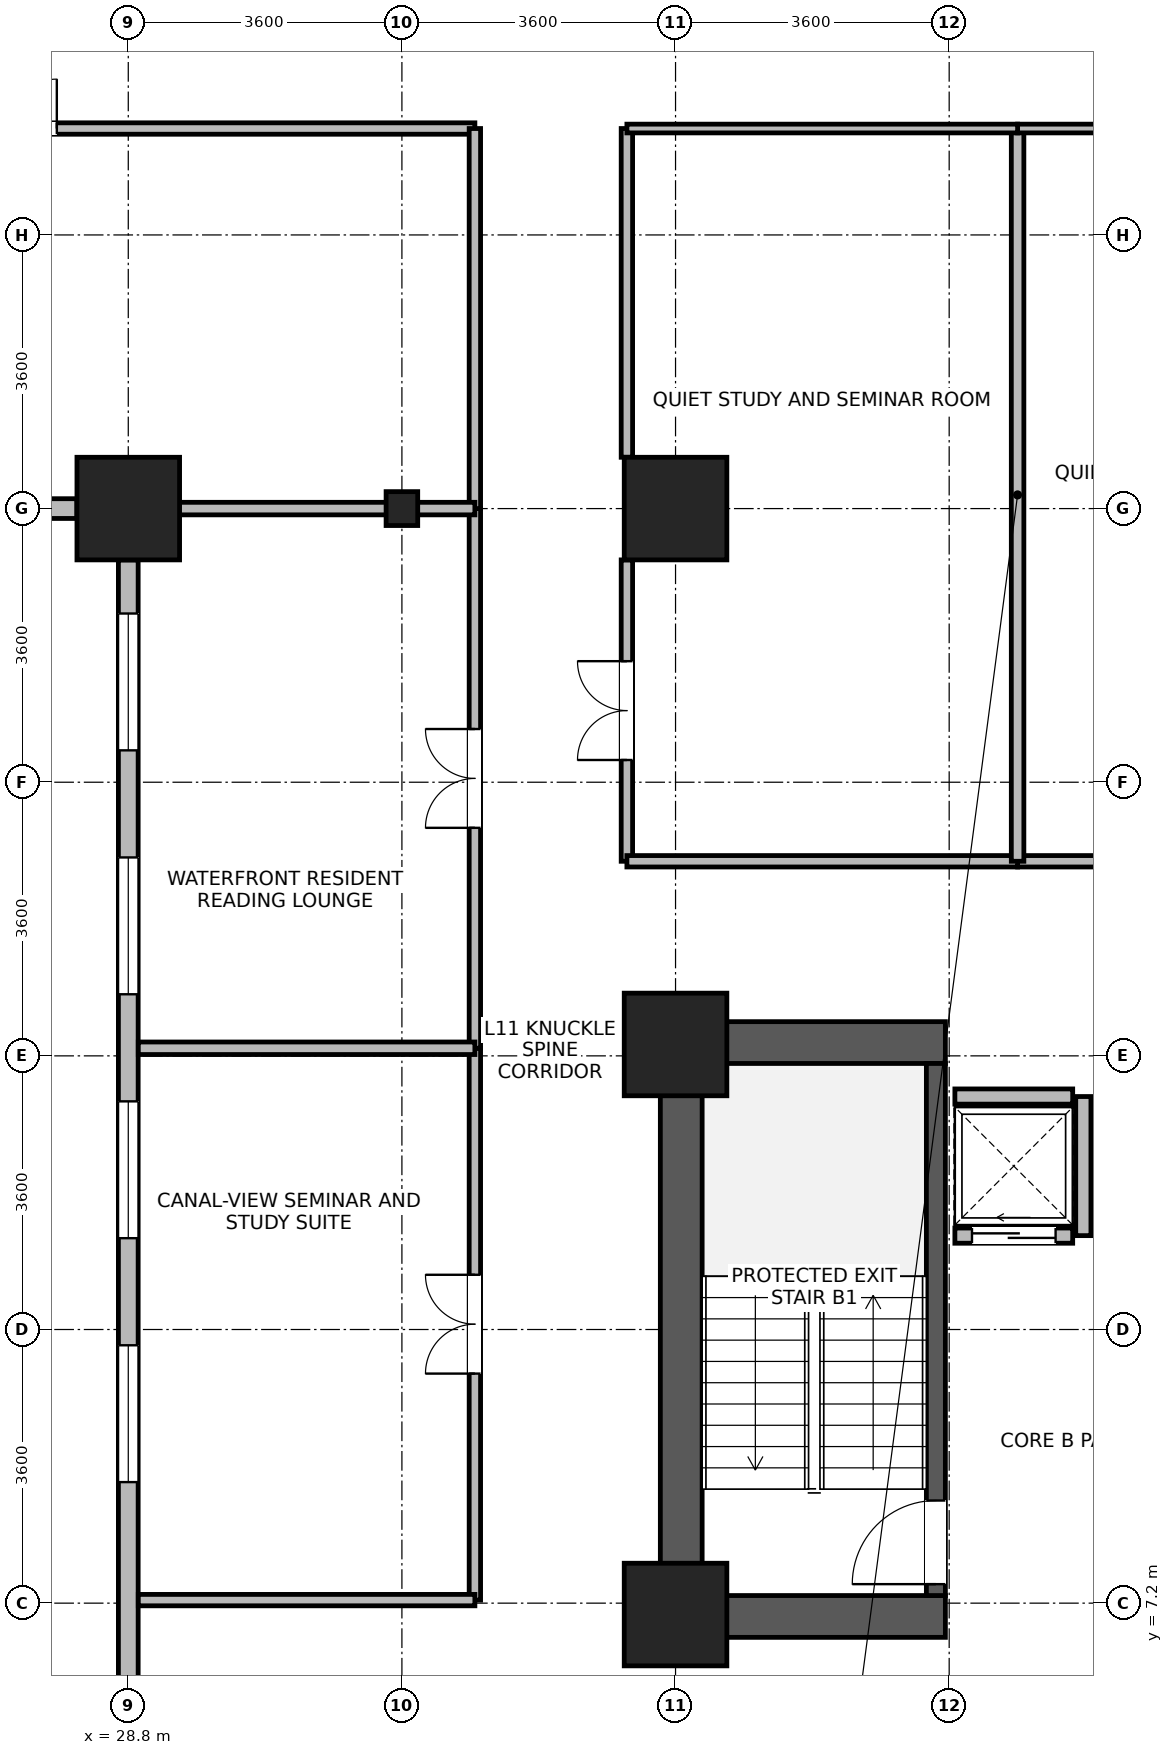
"""IFC4 building model, lengths in metres.
Left out: names, types, materials, properties, quantities, classifications, styles, units other than length and angle.
Written with IfcOpenShell. Run it as: python <this file> out.ifc"""

import sys

from ifc_helpers import new_model, si_unit, direction, frame, frame_2d, origin, origin_2d, place, context, subcontext, project, spatial, rectangle, i_section, extrude, source, transform, mapped, element, fill, save


model = new_model("IFC4")
c1 = context("Model", 3, precision=1e-05, world=origin(), true_north=direction((0.0, 1.0)))
c2 = subcontext(c1, "Body", "Model", "MODEL_VIEW")
j1 = project(units=[si_unit("LENGTHUNIT", "METRE"), si_unit("PLANEANGLEUNIT", "RADIAN")], contexts=[c1])
p1 = place(None, origin())
s1 = spatial("IfcSite", under=j1, at=p1, CompositionType="ELEMENT")
p2 = place(p1, origin())
s2 = spatial("IfcBuilding", under=s1, at=p2, CompositionType="ELEMENT")
p3 = place(p2, frame((0.0, 0.0, 47.5)))
s3 = spatial("IfcBuildingStorey", under=s2, at=p3, CompositionType="ELEMENT", Elevation=47.5)
p4 = place(p3, frame((36.075, 6.75, 0.0), z_axis=(0.0, 0.0, 1.0), x_axis=(0.0, 1.0, 0.0)))
e1 = element("IfcWall", 1, at=p4, inside=s3, PredefinedType="SHEAR", context=c2, shape_type="SweptSolid", body=[
    extrude(rectangle(XDim=8.1, YDim=0.55, at=frame_2d((4.05, 0.0))), origin(), (0.0, 0.0, 1.0), 3.45),
])
for number, where, z_axis, x_axis in (
    (2, (36.35, 7.025, 0.0), (0.0, 0.0, 1.0), (1.0, 0.0, 0.0)),
    (3, (36.35, 14.575, 0.0), (0.0, 0.0, 1.0), (1.0, 0.0, 0.0)),
):
    element("IfcWall", number, at=place(p3, frame(where, z_axis=z_axis, x_axis=x_axis)), inside=s3, PredefinedType="SHEAR", context=c2, shape_type="SweptSolid", body=[
        extrude(rectangle(XDim=3.2, YDim=0.55, at=frame_2d((1.6, 0.0))), origin(), (0.0, 0.0, 1.0), 3.45),
    ])
p5 = place(p3, frame((39.425, 7.3, 0.0), z_axis=(0.0, 0.0, 1.0), x_axis=(0.0, 1.0, 0.0)))
e4 = element("IfcWall", 4, at=p5, inside=s3, PredefinedType="SHEAR", context=c2, shape_type="SweptSolid", body=[
    extrude(rectangle(XDim=7.0, YDim=0.25, at=frame_2d((3.5, 0.0))), origin(), (0.0, 0.0, 1.0), 3.45),
])
p6 = place(p5, frame((0.15, 0.0, 0.0)))
e5 = element("IfcOpeningElement", 5, at=p6, cuts=e4, PredefinedType="OPENING", context=c2, shape_type="SweptSolid", body=[
    extrude(rectangle(XDim=1.1, YDim=2.08, at=frame_2d((0.55, 1.04))), frame((0.0, 0.135, 0.0), z_axis=(0.0, -1.0, 0.0), x_axis=(1.0, 0.0, 0.0)), (0.0, 0.0, 1.0), 0.27),
])
m1 = source(origin(), c2, "Body", "SweptSolid", [
    extrude(rectangle(XDim=1.35, YDim=1.35, at=origin_2d()), origin(), (0.0, 0.0, 1.0), 3.7),
])
for number, where, z_axis, x_axis in (
    (6, (28.8, 21.6, 0.0), (0.0, 0.0, 1.0), (1.0, 0.0, 0.0)),
    (7, (36.0, 21.6, 0.0), (0.0, 0.0, 1.0), (1.0, 0.0, 0.0)),
    (8, (36.0, 7.05, 0.0), (0.0, 0.0, 1.0), (1.0, 0.0, 0.0)),
    (9, (36.0, 14.55, 0.0), (0.0, 0.0, 1.0), (1.0, 0.0, 0.0)),
):
    element("IfcColumn", number, at=place(p3, frame(where, z_axis=z_axis, x_axis=x_axis)), inside=s3, PredefinedType="COLUMN", context=c2, shape_type="MappedRepresentation", body=[
        mapped(m1, transform((0.0, 0.0, 0.0), x_axis=(1.0, 0.0, 0.0), y_axis=(0.0, 1.0, 0.0), z_axis=(0.0, 0.0, 1.0), scale=1.0)),
    ])
m2 = source(origin(), c2, "Body", "SweptSolid", [
    extrude(i_section(OverallWidth=0.416, OverallDepth=0.446, WebThickness=0.029, FlangeThickness=0.04, FilletRadius=0.015, at=origin_2d()), origin(), (0.0, 0.0, 1.0), 3.7),
])
p7 = place(p3, frame((32.4, 21.6, 0.0), z_axis=(0.0, 0.0, 1.0), x_axis=(1.0, 0.0, 0.0)))
e10 = element("IfcColumn", 10, at=p7, inside=s3, PredefinedType="COLUMN", context=c2, shape_type="MappedRepresentation", body=[
    mapped(m2, transform((0.0, 0.0, 0.0), x_axis=(1.0, 0.0, 0.0), y_axis=(0.0, 1.0, 0.0), z_axis=(0.0, 0.0, 1.0), scale=1.0)),
])
p8 = place(p3, frame((28.124, 21.6, 0.0), z_axis=(0.0, 0.0, 1.0), x_axis=(-1.0, 0.0, 0.0)))
e11 = element("IfcWall", 11, at=p8, inside=s3, PredefinedType="STANDARD", context=c2, shape_type="SweptSolid", body=[
    extrude(rectangle(XDim=2.715, YDim=0.26, at=frame_2d((1.357, 0.0))), origin(), (0.0, 0.0, 1.0), 2.93),
])
p9 = place(p8, frame((0.883, 0.0, 0.85)))
e12 = element("IfcOpeningElement", 12, at=p9, cuts=e11, PredefinedType="OPENING", context=c2, shape_type="SweptSolid", body=[
    extrude(rectangle(XDim=0.95, YDim=1.75, at=frame_2d((0.475, 0.875))), frame((0.0, 0.14, 0.0), z_axis=(0.0, -1.0, 0.0), x_axis=(1.0, 0.0, 0.0)), (0.0, 0.0, 1.0), 0.28),
])
p10 = place(p3, frame((28.8, 1.67, 0.0), z_axis=(0.0, 0.0, 1.0), x_axis=(0.0, 1.0, 0.0)))
e13 = element("IfcWall", 13, at=p10, inside=s3, PredefinedType="STANDARD", context=c2, shape_type="SweptSolid", body=[
    extrude(rectangle(XDim=19.254, YDim=0.26, at=frame_2d((9.627, 0.0))), origin(), (0.0, 0.0, 1.0), 3.43),
])
p11 = place(p10, frame((0.705, 0.0, 0.85)))
e14 = element("IfcOpeningElement", 14, at=p11, cuts=e13, PredefinedType="OPENING", context=c2, shape_type="SweptSolid", body=[
    extrude(rectangle(XDim=1.8, YDim=1.85, at=frame_2d((0.9, 0.925))), frame((0.0, 0.14, 0.0), z_axis=(0.0, -1.0, 0.0), x_axis=(1.0, 0.0, 0.0)), (0.0, 0.0, 1.0), 0.28),
])
p12 = place(p10, frame((7.123, 0.0, 0.85)))
e15 = element("IfcOpeningElement", 15, at=p12, cuts=e13, PredefinedType="OPENING", context=c2, shape_type="SweptSolid", body=[
    extrude(rectangle(XDim=1.8, YDim=1.85, at=frame_2d((0.9, 0.925))), frame((0.0, 0.14, 0.0), z_axis=(0.0, -1.0, 0.0), x_axis=(1.0, 0.0, 0.0)), (0.0, 0.0, 1.0), 0.28),
])
p13 = place(p10, frame((10.332, 0.0, 0.85)))
e16 = element("IfcOpeningElement", 16, at=p13, cuts=e13, PredefinedType="OPENING", context=c2, shape_type="SweptSolid", body=[
    extrude(rectangle(XDim=1.8, YDim=1.85, at=frame_2d((0.9, 0.925))), frame((0.0, 0.14, 0.0), z_axis=(0.0, -1.0, 0.0), x_axis=(1.0, 0.0, 0.0)), (0.0, 0.0, 1.0), 0.28),
])
p14 = place(p10, frame((13.541, 0.0, 0.85)))
e17 = element("IfcOpeningElement", 17, at=p14, cuts=e13, PredefinedType="OPENING", context=c2, shape_type="SweptSolid", body=[
    extrude(rectangle(XDim=1.8, YDim=1.85, at=frame_2d((0.9, 0.925))), frame((0.0, 0.14, 0.0), z_axis=(0.0, -1.0, 0.0), x_axis=(1.0, 0.0, 0.0)), (0.0, 0.0, 1.0), 0.28),
])
p15 = place(p10, frame((16.75, 0.0, 0.85)))
e18 = element("IfcOpeningElement", 18, at=p15, cuts=e13, PredefinedType="OPENING", context=c2, shape_type="SweptSolid", body=[
    extrude(rectangle(XDim=1.8, YDim=1.85, at=frame_2d((0.9, 0.925))), frame((0.0, 0.14, 0.0), z_axis=(0.0, -1.0, 0.0), x_axis=(1.0, 0.0, 0.0)), (0.0, 0.0, 1.0), 0.28),
])
p16 = place(p3, frame((39.675, 12.035, 0.0), z_axis=(0.0, 0.0, 1.0), x_axis=(1.0, 0.0, 0.0)))
e19 = element("IfcWall", 19, at=p16, inside=s3, PredefinedType="PARTITIONING", context=c2, shape_type="SweptSolid", body=[
    extrude(rectangle(XDim=1.55, YDim=0.2, at=frame_2d((0.775, 0.0))), origin(), (0.0, 0.0, 1.0), 3.43),
])
p17 = place(p16, frame((0.225, 0.0, 0.0)))
e20 = element("IfcOpeningElement", 20, at=p17, cuts=e19, PredefinedType="OPENING", context=c2, shape_type="SweptSolid", body=[
    extrude(rectangle(XDim=1.1, YDim=2.12, at=frame_2d((0.55, 1.06))), frame((0.0, 0.11, 0.0), z_axis=(0.0, -1.0, 0.0), x_axis=(1.0, 0.0, 0.0)), (0.0, 0.0, 1.0), 0.22),
])
p18 = place(p3, frame((39.675, 13.865, 0.0), z_axis=(0.0, 0.0, 1.0), x_axis=(1.0, 0.0, 0.0)))
e21 = element("IfcWall", 21, at=p18, inside=s3, PredefinedType="PARTITIONING", context=c2, shape_type="SweptSolid", body=[
    extrude(rectangle(XDim=1.55, YDim=0.2, at=frame_2d((0.775, 0.0))), origin(), (0.0, 0.0, 1.0), 3.43),
])
p19 = place(p3, frame((41.365, 12.035, 0.0), z_axis=(0.0, 0.0, 1.0), x_axis=(0.0, 1.0, 0.0)))
e22 = element("IfcWall", 22, at=p19, inside=s3, PredefinedType="PARTITIONING", context=c2, shape_type="SweptSolid", body=[
    extrude(rectangle(XDim=1.83, YDim=0.2, at=frame_2d((0.915, 0.0))), origin(), (0.0, 0.0, 1.0), 3.43),
])
p20 = place(p3, frame((21.06, 26.6, 0.0), z_axis=(0.0, 0.0, 1.0), x_axis=(1.0, 0.0, 0.0)))
e23 = element("IfcWall", 23, at=p20, inside=s3, PredefinedType="PARTITIONING", context=c2, shape_type="SweptSolid", body=[
    extrude(rectangle(XDim=12.3, YDim=0.15, at=frame_2d((6.15, 0.0))), origin(), (0.0, 0.0, 1.0), 3.43),
])
p21 = place(p20, frame((5.5, 0.0, 0.0)))
e24 = element("IfcOpeningElement", 24, at=p21, cuts=e23, PredefinedType="OPENING", context=c2, shape_type="SweptSolid", body=[
    extrude(rectangle(XDim=1.3, YDim=2.12, at=frame_2d((0.65, 1.06))), frame((0.0, 0.085, 0.0), z_axis=(0.0, -1.0, 0.0), x_axis=(1.0, 0.0, 0.0)), (0.0, 0.0, 1.0), 0.17),
])
p22 = place(p3, frame((35.36, 16.96, 0.0), z_axis=(0.0, 0.0, 1.0), x_axis=(0.0, 1.0, 0.0)))
e25 = element("IfcWall", 25, at=p22, inside=s3, PredefinedType="PARTITIONING", context=c2, shape_type="SweptSolid", body=[
    extrude(rectangle(XDim=3.965, YDim=0.15, at=frame_2d((1.982, 0.0))), origin(), (0.0, 0.0, 1.0), 3.43),
])
p23 = place(p22, frame((1.333, 0.0, 0.0)))
e26 = element("IfcOpeningElement", 26, at=p23, cuts=e25, PredefinedType="OPENING", context=c2, shape_type="SweptSolid", body=[
    extrude(rectangle(XDim=1.3, YDim=2.12, at=frame_2d((0.65, 1.06))), frame((0.0, 0.085, 0.0), z_axis=(0.0, -1.0, 0.0), x_axis=(1.0, 0.0, 0.0)), (0.0, 0.0, 1.0), 0.17),
])
p24 = place(p3, frame((35.36, 22.275, 0.0), z_axis=(0.0, 0.0, 1.0), x_axis=(0.0, 1.0, 0.0)))
e27 = element("IfcWall", 27, at=p24, inside=s3, PredefinedType="PARTITIONING", context=c2, shape_type="SweptSolid", body=[
    extrude(rectangle(XDim=4.325, YDim=0.15, at=frame_2d((2.163, 0.0))), origin(), (0.0, 0.0, 1.0), 3.43),
])
p25 = place(p3, frame((33.36, 7.24, 0.0), z_axis=(0.0, 0.0, 1.0), x_axis=(0.0, 1.0, 0.0)))
e28 = element("IfcWall", 28, at=p25, inside=s3, PredefinedType="PARTITIONING", context=c2, shape_type="SweptSolid", body=[
    extrude(rectangle(XDim=7.26, YDim=0.15, at=frame_2d((3.63, 0.0))), origin(), (0.0, 0.0, 1.0), 3.43),
])
p26 = place(p25, frame((2.98, 0.0, 0.0)))
e29 = element("IfcOpeningElement", 29, at=p26, cuts=e28, PredefinedType="OPENING", context=c2, shape_type="SweptSolid", body=[
    extrude(rectangle(XDim=1.3, YDim=2.12, at=frame_2d((0.65, 1.06))), frame((0.0, 0.085, 0.0), z_axis=(0.0, -1.0, 0.0), x_axis=(1.0, 0.0, 0.0)), (0.0, 0.0, 1.0), 0.17),
])
p27 = place(p3, frame((33.36, 14.5, 0.0), z_axis=(0.0, 0.0, 1.0), x_axis=(0.0, 1.0, 0.0)))
e30 = element("IfcWall", 30, at=p27, inside=s3, PredefinedType="PARTITIONING", context=c2, shape_type="SweptSolid", body=[
    extrude(rectangle(XDim=7.1, YDim=0.15, at=frame_2d((3.55, 0.0))), origin(), (0.0, 0.0, 1.0), 3.43),
])
p28 = place(p27, frame((2.9, 0.0, 0.0)))
e31 = element("IfcOpeningElement", 31, at=p28, cuts=e30, PredefinedType="OPENING", context=c2, shape_type="SweptSolid", body=[
    extrude(rectangle(XDim=1.3, YDim=2.12, at=frame_2d((0.65, 1.06))), frame((0.0, 0.085, 0.0), z_axis=(0.0, -1.0, 0.0), x_axis=(1.0, 0.0, 0.0)), (0.0, 0.0, 1.0), 0.17),
])
p29 = place(p3, frame((40.5, 16.96, 0.0), z_axis=(0.0, 0.0, 1.0), x_axis=(1.0, 0.0, 0.0)))
e32 = element("IfcWall", 32, at=p29, inside=s3, PredefinedType="PARTITIONING", context=c2, shape_type="SweptSolid", body=[
    extrude(rectangle(XDim=5.42, YDim=0.15, at=frame_2d((2.71, 0.0))), origin(), (0.0, 0.0, 1.0), 3.43),
])
p30 = place(p29, frame((2.06, 0.0, 0.0)))
e33 = element("IfcOpeningElement", 33, at=p30, cuts=e32, PredefinedType="OPENING", context=c2, shape_type="SweptSolid", body=[
    extrude(rectangle(XDim=1.3, YDim=2.12, at=frame_2d((0.65, 1.06))), frame((0.0, 0.085, 0.0), z_axis=(0.0, -1.0, 0.0), x_axis=(1.0, 0.0, 0.0)), (0.0, 0.0, 1.0), 0.17),
])
p31 = place(p3, frame((35.36, 16.96, 0.0), z_axis=(0.0, 0.0, 1.0), x_axis=(1.0, 0.0, 0.0)))
e34 = element("IfcWall", 34, at=p31, inside=s3, PredefinedType="PARTITIONING", context=c2, shape_type="SweptSolid", body=[
    extrude(rectangle(XDim=5.14, YDim=0.15, at=frame_2d((2.57, 0.0))), origin(), (0.0, 0.0, 1.0), 3.43),
])
p32 = place(p3, frame((33.36, 21.6, 0.0), z_axis=(0.0, 0.0, 1.0), x_axis=(0.0, 1.0, 0.0)))
e35 = element("IfcWall", 35, at=p32, inside=s3, PredefinedType="PARTITIONING", context=c2, shape_type="SweptSolid", body=[
    extrude(rectangle(XDim=5.0, YDim=0.15, at=frame_2d((2.5, 0.0))), origin(), (0.0, 0.0, 1.0), 3.43),
])
p33 = place(p3, frame((28.932, 7.24, 0.0), z_axis=(0.0, 0.0, 1.0), x_axis=(1.0, 0.0, 0.0)))
e36 = element("IfcWall", 36, at=p33, inside=s3, PredefinedType="PARTITIONING", context=c2, shape_type="SweptSolid", body=[
    extrude(rectangle(XDim=4.428, YDim=0.15, at=frame_2d((2.214, 0.0))), origin(), (0.0, 0.0, 1.0), 3.43),
])
p34 = place(p3, frame((40.5, 16.96, 0.0), z_axis=(0.0, 0.0, 1.0), x_axis=(0.0, 1.0, 0.0)))
e37 = element("IfcWall", 37, at=p34, inside=s3, PredefinedType="PARTITIONING", context=c2, shape_type="SweptSolid", body=[
    extrude(rectangle(XDim=9.64, YDim=0.165, at=frame_2d((4.82, 0.0))), origin(), (0.0, 0.0, 1.0), 3.43),
])
p35 = place(p3, frame((40.5, 26.6, 0.0), z_axis=(0.0, 0.0, 1.0), x_axis=(1.0, 0.0, 0.0)))
e38 = element("IfcWall", 38, at=p35, inside=s3, PredefinedType="PARTITIONING", context=c2, shape_type="SweptSolid", body=[
    extrude(rectangle(XDim=5.42, YDim=0.115, at=frame_2d((2.71, 0.0))), origin(), (0.0, 0.0, 1.0), 3.43),
])
p36 = place(p3, frame((35.36, 26.6, 0.0), z_axis=(0.0, 0.0, 1.0), x_axis=(1.0, 0.0, 0.0)))
e39 = element("IfcWall", 39, at=p36, inside=s3, PredefinedType="PARTITIONING", context=c2, shape_type="SweptSolid", body=[
    extrude(rectangle(XDim=5.14, YDim=0.115, at=frame_2d((2.57, 0.0))), origin(), (0.0, 0.0, 1.0), 3.43),
])
p37 = place(p3, frame((28.932, 14.5, 0.0), z_axis=(0.0, 0.0, 1.0), x_axis=(1.0, 0.0, 0.0)))
e40 = element("IfcWall", 40, at=p37, inside=s3, PredefinedType="PARTITIONING", context=c2, shape_type="SweptSolid", body=[
    extrude(rectangle(XDim=4.428, YDim=0.165, at=frame_2d((2.214, 0.0))), origin(), (0.0, 0.0, 1.0), 3.43),
])
p38 = place(p3, frame((28.932, 21.6, 0.0), z_axis=(0.0, 0.0, 1.0), x_axis=(1.0, 0.0, 0.0)))
e41 = element("IfcWall", 41, at=p38, inside=s3, PredefinedType="PARTITIONING", context=c2, shape_type="SweptSolid", body=[
    extrude(rectangle(XDim=4.428, YDim=0.165, at=frame_2d((2.214, 0.0))), origin(), (0.0, 0.0, 1.0), 2.93),
])
p39 = place(p12, origin())
e42 = element("IfcWindow", 42, at=p39, inside=s3, PartitioningType="SINGLE_PANEL", PredefinedType="WINDOW", context=c2, shape_type="SweptSolid", body=[
    extrude(rectangle(XDim=1.8, YDim=1.85, at=frame_2d((0.9, 0.925))), frame((0.0, 0.03, 0.0), z_axis=(0.0, -1.0, 0.0), x_axis=(1.0, 0.0, 0.0)), (0.0, 0.0, 1.0), 0.06),
])
fill(e15, e42)
p40 = place(p13, origin())
e43 = element("IfcWindow", 43, at=p40, inside=s3, PartitioningType="SINGLE_PANEL", PredefinedType="WINDOW", context=c2, shape_type="SweptSolid", body=[
    extrude(rectangle(XDim=1.8, YDim=1.85, at=frame_2d((0.9, 0.925))), frame((0.0, 0.03, 0.0), z_axis=(0.0, -1.0, 0.0), x_axis=(1.0, 0.0, 0.0)), (0.0, 0.0, 1.0), 0.06),
])
fill(e16, e43)
p41 = place(p14, origin())
e44 = element("IfcWindow", 44, at=p41, inside=s3, PartitioningType="SINGLE_PANEL", PredefinedType="WINDOW", context=c2, shape_type="SweptSolid", body=[
    extrude(rectangle(XDim=1.8, YDim=1.85, at=frame_2d((0.9, 0.925))), frame((0.0, 0.03, 0.0), z_axis=(0.0, -1.0, 0.0), x_axis=(1.0, 0.0, 0.0)), (0.0, 0.0, 1.0), 0.06),
])
fill(e17, e44)
p42 = place(p15, origin())
e45 = element("IfcWindow", 45, at=p42, inside=s3, PartitioningType="SINGLE_PANEL", PredefinedType="WINDOW", context=c2, shape_type="SweptSolid", body=[
    extrude(rectangle(XDim=1.8, YDim=1.85, at=frame_2d((0.9, 0.925))), frame((0.0, 0.03, 0.0), z_axis=(0.0, -1.0, 0.0), x_axis=(1.0, 0.0, 0.0)), (0.0, 0.0, 1.0), 0.06),
])
fill(e18, e45)
p43 = place(p6, origin())
e46 = element("IfcDoor", 46, at=p43, inside=s3, OperationType="SINGLE_SWING_LEFT", PredefinedType="DOOR", context=c2, shape_type="SweptSolid", body=[
    extrude(rectangle(XDim=1.1, YDim=2.08, at=frame_2d((0.55, 1.04))), frame((0.0, 0.025, 0.0), z_axis=(0.0, -1.0, 0.0), x_axis=(1.0, 0.0, 0.0)), (0.0, 0.0, 1.0), 0.05),
])
fill(e5, e46)
p44 = place(p17, origin())
e47 = element("IfcDoor", 47, at=p44, inside=s3, OperationType="SLIDING_TO_LEFT", PredefinedType="DOOR", context=c2, shape_type="SweptSolid", body=[
    extrude(rectangle(XDim=1.1, YDim=2.12, at=frame_2d((0.55, 1.06))), frame((0.0, 0.025, 0.0), z_axis=(0.0, -1.0, 0.0), x_axis=(1.0, 0.0, 0.0)), (0.0, 0.0, 1.0), 0.05),
])
fill(e20, e47)
p45 = place(p21, origin())
e48 = element("IfcDoor", 48, at=p45, inside=s3, OperationType="DOUBLE_DOOR_SINGLE_SWING", PredefinedType="DOOR", context=c2, shape_type="SweptSolid", body=[
    extrude(rectangle(XDim=1.3, YDim=2.12, at=frame_2d((0.65, 1.06))), frame((0.0, 0.025, 0.0), z_axis=(0.0, -1.0, 0.0), x_axis=(1.0, 0.0, 0.0)), (0.0, 0.0, 1.0), 0.05),
])
fill(e24, e48)
p46 = place(p23, origin())
e49 = element("IfcDoor", 49, at=p46, inside=s3, OperationType="DOUBLE_DOOR_SINGLE_SWING", PredefinedType="DOOR", context=c2, shape_type="SweptSolid", body=[
    extrude(rectangle(XDim=1.3, YDim=2.12, at=frame_2d((0.65, 1.06))), frame((0.0, 0.025, 0.0), z_axis=(0.0, -1.0, 0.0), x_axis=(1.0, 0.0, 0.0)), (0.0, 0.0, 1.0), 0.05),
])
fill(e26, e49)
p47 = place(p26, origin())
e50 = element("IfcDoor", 50, at=p47, inside=s3, OperationType="DOUBLE_DOOR_SINGLE_SWING", PredefinedType="DOOR", context=c2, shape_type="SweptSolid", body=[
    extrude(rectangle(XDim=1.3, YDim=2.12, at=frame_2d((0.65, 1.06))), frame((0.0, 0.025, 0.0), z_axis=(0.0, -1.0, 0.0), x_axis=(1.0, 0.0, 0.0)), (0.0, 0.0, 1.0), 0.05),
])
fill(e29, e50)
p48 = place(p28, origin())
e51 = element("IfcDoor", 51, at=p48, inside=s3, OperationType="DOUBLE_DOOR_SINGLE_SWING", PredefinedType="DOOR", context=c2, shape_type="SweptSolid", body=[
    extrude(rectangle(XDim=1.3, YDim=2.12, at=frame_2d((0.65, 1.06))), frame((0.0, 0.025, 0.0), z_axis=(0.0, -1.0, 0.0), x_axis=(1.0, 0.0, 0.0)), (0.0, 0.0, 1.0), 0.05),
])
fill(e31, e51)
save(model, sys.argv[1])
